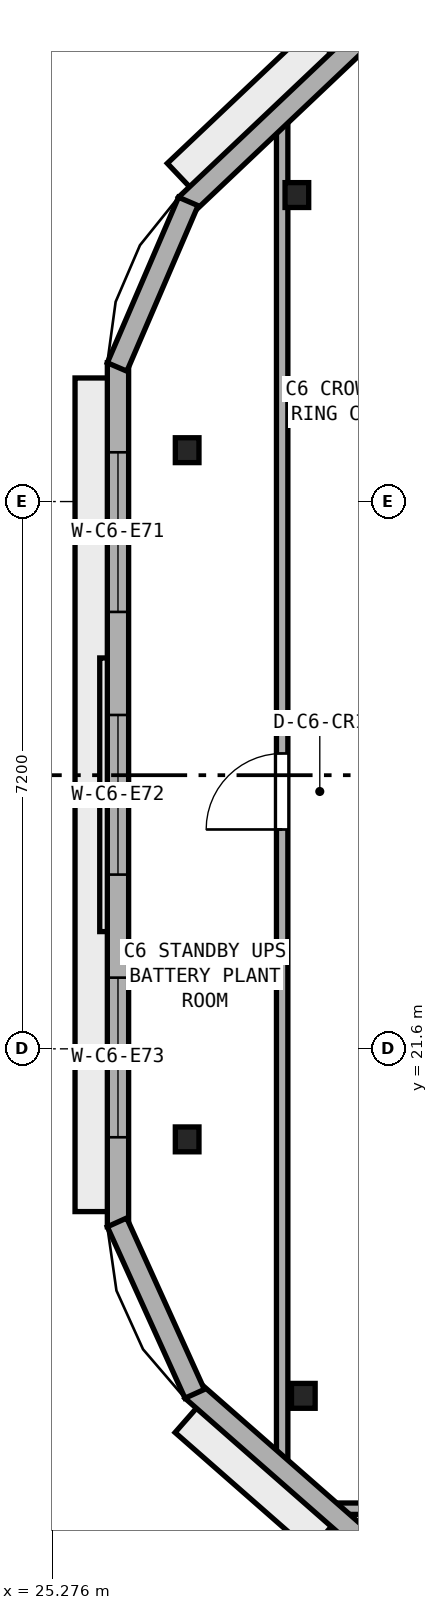
"""IFC4 building model, lengths in metres.
Left out: names, types, materials, properties, quantities, classifications, styles, units other than length and angle.
Written with IfcOpenShell. Run it as: python <this file> out.ifc"""

import sys

from ifc_helpers import new_model, si_unit, direction, frame, frame_2d, origin, origin_2d, place, context, subcontext, project, spatial, rectangle, i_section, extrude, element, fill, save


model = new_model("IFC4")
c1 = context("Model", 3, precision=1e-05, world=origin(), true_north=direction((0.0, 1.0)))
c2 = subcontext(c1, "Body", "Model", "MODEL_VIEW")
j1 = project(units=[si_unit("LENGTHUNIT", "METRE"), si_unit("PLANEANGLEUNIT", "RADIAN")], contexts=[c1])
p1 = place(None, origin())
s1 = spatial("IfcSite", under=j1, at=p1, CompositionType="ELEMENT")
p2 = place(p1, origin())
s2 = spatial("IfcBuilding", under=s1, at=p2, CompositionType="ELEMENT")
p3 = place(p2, frame((0.0, 0.0, 333.4)))
s3 = spatial("IfcBuildingStorey", under=s2, at=p3, CompositionType="ELEMENT", Elevation=333.4)
for number, where, z_axis, x_axis in (
    (1, (28.493, 32.832, 0.0), (0.0, 0.0, 1.0), (1.0, 0.0, 0.0)),
    (2, (27.05, 29.476, 0.0), (0.0, 0.0, 1.0), (1.0, 0.0, 0.0)),
    (3, (27.05, 20.409, 0.0), (0.0, 0.0, 1.0), (1.0, 0.0, 0.0)),
    (4, (28.578, 17.035, 0.0), (0.0, 0.0, 1.0), (1.0, 0.0, 0.0)),
):
    element("IfcColumn", number, at=place(p3, frame(where, z_axis=z_axis, x_axis=x_axis)), inside=s3, PredefinedType="COLUMN", context=c2, shape_type="SweptSolid", body=[
        extrude(i_section(OverallWidth=0.311, OverallDepth=0.327, WebThickness=0.016, FlangeThickness=0.025, at=origin_2d()), origin(), (0.0, 0.0, 1.0), 4.0),
    ])
p4 = place(p3, frame((28.3, 16.022, 0.0), z_axis=(0.0, 0.0, 1.0), x_axis=(0.0, 1.0, 0.0)))
e5 = element("IfcWall", 5, at=p4, inside=s3, PredefinedType="PARTITIONING", context=c2, shape_type="SweptSolid", body=[
    extrude(rectangle(XDim=17.933, YDim=0.15, at=frame_2d((8.967, 0.0))), origin(), (0.0, 0.0, 1.0), 3.156),
])
p5 = place(p4, frame((8.464, 0.0, 0.0)))
e6 = element("IfcOpeningElement", 6, at=p5, cuts=e5, PredefinedType="OPENING", context=c2, shape_type="SweptSolid", body=[
    extrude(rectangle(XDim=1.0, YDim=2.12, at=frame_2d((0.5, 1.06))), frame((0.0, 0.085, 0.0), z_axis=(0.0, -1.0, 0.0), x_axis=(1.0, 0.0, 0.0)), (0.0, 0.0, 1.0), 0.17),
])
p6 = place(p3, frame((28.818, 15.55, 0.0), z_axis=(0.0, 0.0, 1.0), x_axis=(1.0, 0.0, 0.0)))
e7 = element("IfcWall", 7, at=p6, inside=s3, PredefinedType="PARTITIONING", context=c2, shape_type="SweptSolid", body=[
    extrude(rectangle(XDim=23.98, YDim=0.15, at=frame_2d((11.99, 0.0))), origin(), (0.0, 0.0, 1.0), 3.7),
])
p7 = place(p6, frame((10.583, 0.0, 0.0)))
e8 = element("IfcOpeningElement", 8, at=p7, cuts=e7, PredefinedType="OPENING", context=c2, shape_type="SweptSolid", body=[
    extrude(rectangle(XDim=1.0, YDim=2.12, at=frame_2d((0.5, 1.06))), frame((0.0, 0.085, 0.0), z_axis=(0.0, -1.0, 0.0), x_axis=(1.0, 0.0, 0.0)), (0.0, 0.0, 1.0), 0.17),
])
p8 = place(p3, frame((33.654, 38.976, 0.0), z_axis=(0.0, 0.0, 1.0), x_axis=(-0.72588023988, -0.687821108539, 0.0)))
e9 = element("IfcWall", 9, at=p8, inside=s3, PredefinedType="STANDARD", context=c2, shape_type="SweptSolid", body=[
    extrude(rectangle(XDim=9.122, YDim=0.28, at=frame_2d((4.561, 0.0))), origin(), (0.0, 0.0, 1.0), 3.7),
])
p9 = place(p8, frame((1.054, 0.0, 0.9)))
e10 = element("IfcOpeningElement", 10, at=p9, cuts=e9, PredefinedType="OPENING", context=c2, shape_type="SweptSolid", body=[
    extrude(rectangle(XDim=1.6, YDim=1.45, at=frame_2d((0.8, 0.725))), frame((0.0, 0.15, 0.0), z_axis=(0.0, -1.0, 0.0), x_axis=(1.0, 0.0, 0.0)), (0.0, 0.0, 1.0), 0.3),
])
p10 = place(p8, frame((3.511, 0.0, 0.9)))
e11 = element("IfcOpeningElement", 11, at=p10, cuts=e9, PredefinedType="OPENING", context=c2, shape_type="SweptSolid", body=[
    extrude(rectangle(XDim=1.6, YDim=1.45, at=frame_2d((0.8, 0.725))), frame((0.0, 0.15, 0.0), z_axis=(0.0, -1.0, 0.0), x_axis=(1.0, 0.0, 0.0)), (0.0, 0.0, 1.0), 0.3),
])
p11 = place(p3, frame((26.14, 30.626, 0.0), z_axis=(0.0, 0.0, 1.0), x_axis=(0.0, -1.0, 0.0)))
e12 = element("IfcWall", 12, at=p11, inside=s3, PredefinedType="STANDARD", context=c2, shape_type="SweptSolid", body=[
    extrude(rectangle(XDim=11.367, YDim=0.28, at=frame_2d((5.684, 0.0))), origin(), (0.0, 0.0, 1.0), 3.7),
])
p12 = place(p11, frame((1.178, 0.0, 0.9)))
e13 = element("IfcOpeningElement", 13, at=p12, cuts=e12, PredefinedType="OPENING", context=c2, shape_type="SweptSolid", body=[
    extrude(rectangle(XDim=2.1, YDim=1.7, at=frame_2d((1.05, 0.85))), frame((0.0, 0.15, 0.0), z_axis=(0.0, -1.0, 0.0), x_axis=(1.0, 0.0, 0.0)), (0.0, 0.0, 1.0), 0.3),
])
p13 = place(p11, frame((4.634, 0.0, 0.9)))
e14 = element("IfcOpeningElement", 14, at=p13, cuts=e12, PredefinedType="OPENING", context=c2, shape_type="SweptSolid", body=[
    extrude(rectangle(XDim=2.1, YDim=1.7, at=frame_2d((1.05, 0.85))), frame((0.0, 0.15, 0.0), z_axis=(0.0, -1.0, 0.0), x_axis=(1.0, 0.0, 0.0)), (0.0, 0.0, 1.0), 0.3),
])
p14 = place(p11, frame((8.089, 0.0, 0.9)))
e15 = element("IfcOpeningElement", 15, at=p14, cuts=e12, PredefinedType="OPENING", context=c2, shape_type="SweptSolid", body=[
    extrude(rectangle(XDim=2.1, YDim=1.7, at=frame_2d((1.05, 0.85))), frame((0.0, 0.15, 0.0), z_axis=(0.0, -1.0, 0.0), x_axis=(1.0, 0.0, 0.0)), (0.0, 0.0, 1.0), 0.3),
])
p15 = place(p3, frame((27.114, 17.109, 0.0), z_axis=(0.0, 0.0, 1.0), x_axis=(0.751684867815, -0.659522448062, 0.0)))
e16 = element("IfcWall", 16, at=p15, inside=s3, PredefinedType="STANDARD", context=c2, shape_type="SweptSolid", body=[
    extrude(rectangle(XDim=8.723, YDim=0.28, at=frame_2d((4.362, 0.0))), origin(), (0.0, 0.0, 1.0), 3.7),
])
p16 = place(p15, frame((3.562, 0.0, 0.9)))
e17 = element("IfcOpeningElement", 17, at=p16, cuts=e16, PredefinedType="OPENING", context=c2, shape_type="SweptSolid", body=[
    extrude(rectangle(XDim=1.6, YDim=1.45, at=frame_2d((0.8, 0.725))), frame((0.0, 0.15, 0.0), z_axis=(0.0, -1.0, 0.0), x_axis=(1.0, 0.0, 0.0)), (0.0, 0.0, 1.0), 0.3),
])
p17 = place(p15, frame((6.136, 0.0, 0.9)))
e18 = element("IfcOpeningElement", 18, at=p17, cuts=e16, PredefinedType="OPENING", context=c2, shape_type="SweptSolid", body=[
    extrude(rectangle(XDim=1.6, YDim=1.45, at=frame_2d((0.8, 0.725))), frame((0.0, 0.15, 0.0), z_axis=(0.0, -1.0, 0.0), x_axis=(1.0, 0.0, 0.0)), (0.0, 0.0, 1.0), 0.3),
])
p18 = place(p3, frame((27.065, 32.748, 0.0), z_axis=(0.0, 0.0, 1.0), x_axis=(-0.39509989751, -0.918638161077, 0.0)))
e19 = element("IfcWall", 19, at=p18, inside=s3, PredefinedType="STANDARD", context=c2, shape_type="SweptSolid", body=[
    extrude(rectangle(XDim=2.37, YDim=0.28, at=frame_2d((1.185, 0.0))), origin(), (0.0, 0.0, 1.0), 3.7),
])
p19 = place(p3, frame((26.127, 19.317, 0.0), z_axis=(0.0, 0.0, 1.0), x_axis=(0.412606370101, -0.910909426536, 0.0)))
e20 = element("IfcWall", 20, at=p19, inside=s3, PredefinedType="STANDARD", context=c2, shape_type="SweptSolid", body=[
    extrude(rectangle(XDim=2.476, YDim=0.28, at=frame_2d((1.238, 0.0))), origin(), (0.0, 0.0, 1.0), 3.7),
])
p20 = place(p5, origin())
e21 = element("IfcDoor", 21, at=p20, inside=s3, OperationType="SINGLE_SWING_LEFT", PredefinedType="DOOR", context=c2, shape_type="SweptSolid", body=[
    extrude(rectangle(XDim=1.0, YDim=2.12, at=frame_2d((0.5, 1.06))), frame((0.0, 0.025, 0.0), z_axis=(0.0, -1.0, 0.0), x_axis=(1.0, 0.0, 0.0)), (0.0, 0.0, 1.0), 0.05),
])
fill(e6, e21)
p21 = place(p12, origin())
e22 = element("IfcWindow", 22, at=p21, inside=s3, PartitioningType="SINGLE_PANEL", PredefinedType="WINDOW", context=c2, shape_type="SweptSolid", body=[
    extrude(rectangle(XDim=2.1, YDim=1.7, at=frame_2d((1.05, 0.85))), frame((0.0, 0.03, 0.0), z_axis=(0.0, -1.0, 0.0), x_axis=(1.0, 0.0, 0.0)), (0.0, 0.0, 1.0), 0.06),
])
fill(e13, e22)
p22 = place(p13, origin())
e23 = element("IfcWindow", 23, at=p22, inside=s3, PartitioningType="SINGLE_PANEL", PredefinedType="WINDOW", context=c2, shape_type="SweptSolid", body=[
    extrude(rectangle(XDim=2.1, YDim=1.7, at=frame_2d((1.05, 0.85))), frame((0.0, 0.03, 0.0), z_axis=(0.0, -1.0, 0.0), x_axis=(1.0, 0.0, 0.0)), (0.0, 0.0, 1.0), 0.06),
])
fill(e14, e23)
p23 = place(p14, origin())
e24 = element("IfcWindow", 24, at=p23, inside=s3, PartitioningType="SINGLE_PANEL", PredefinedType="WINDOW", context=c2, shape_type="SweptSolid", body=[
    extrude(rectangle(XDim=2.1, YDim=1.7, at=frame_2d((1.05, 0.85))), frame((0.0, 0.03, 0.0), z_axis=(0.0, -1.0, 0.0), x_axis=(1.0, 0.0, 0.0)), (0.0, 0.0, 1.0), 0.06),
])
fill(e15, e24)
save(model, sys.argv[1])
